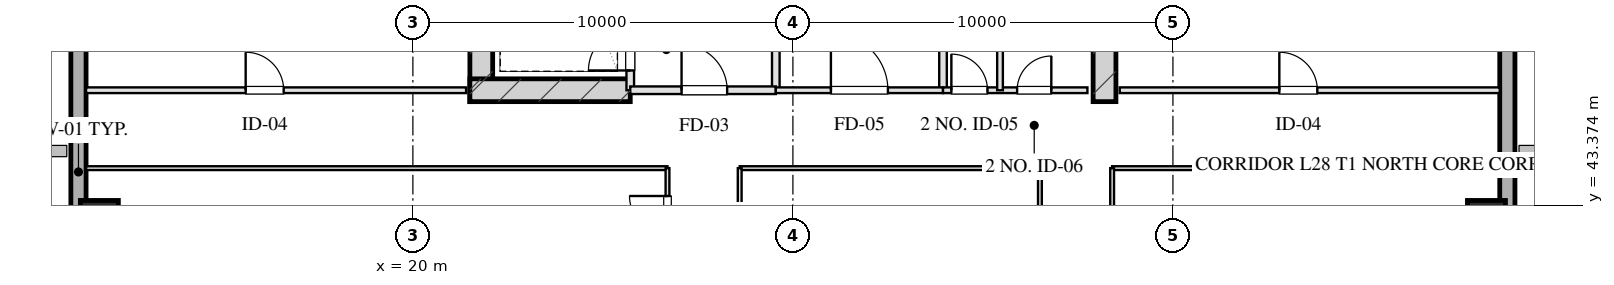
"""IFC4 building model, lengths in metres.
Left out: names, types, materials, properties, quantities, classifications, styles, units other than length and angle.
Written with IfcOpenShell. Run it as: python <this file> out.ifc"""

import sys

from ifc_helpers import new_model, si_unit, direction, frame, frame_2d, origin, origin_2d, place, context, subcontext, project, spatial, rectangle, hollow_rectangle, extrude, element, fill, save


model = new_model("IFC4")
c1 = context("Model", 3, precision=1e-05, world=origin(), true_north=direction((0.0, 1.0)))
c2 = subcontext(c1, "Body", "Model", "MODEL_VIEW")
j1 = project(units=[si_unit("LENGTHUNIT", "METRE"), si_unit("PLANEANGLEUNIT", "RADIAN")], contexts=[c1])
p1 = place(None, origin())
s1 = spatial("IfcSite", under=j1, at=p1, CompositionType="ELEMENT")
p2 = place(p1, origin())
s2 = spatial("IfcBuilding", under=s1, at=p2, CompositionType="ELEMENT")
p3 = place(p2, frame((0.0, 0.0, 110.4)))
s3 = spatial("IfcBuildingStorey", under=s2, at=p3, CompositionType="ELEMENT", Elevation=110.4)
for number, where, z_axis, x_axis in (
    (1, (21.8, 46.1, 0.0), (0.0, 0.0, 1.0), (0.0, 1.0, 0.0)),
    (2, (38.2, 46.1, 0.0), (0.0, 0.0, 1.0), (0.0, 1.0, 0.0)),
):
    element("IfcWall", number, at=place(p3, frame(where, z_axis=z_axis, x_axis=x_axis)), inside=s3, PredefinedType="SHEAR", context=c2, shape_type="SweptSolid", body=[
        extrude(rectangle(XDim=9.48, YDim=0.6, at=frame_2d((4.74, 0.0))), origin(), (0.0, 0.0, 1.0), 3.45),
    ])
p4 = place(p3, frame((21.5, 46.4, 0.0), z_axis=(0.0, 0.0, 1.0), x_axis=(1.0, 0.0, 0.0)))
e3 = element("IfcWall", 3, at=p4, inside=s3, PredefinedType="SHEAR", context=c2, shape_type="SweptSolid", body=[
    extrude(rectangle(XDim=4.22, YDim=0.6, at=frame_2d((2.11, 0.0))), origin(), (0.0, 0.0, 1.0), 3.45),
])
for number, where, z_axis, x_axis in (
    (4, (11.75, 43.0, 0.0), (0.0, 0.0, 1.0), (1.0, 0.0, 0.0)),
    (5, (48.25, 43.0, 0.0), (0.0, 0.0, 1.0), (1.0, 0.0, 0.0)),
):
    element("IfcColumn", number, at=place(p3, frame(where, z_axis=z_axis, x_axis=x_axis)), inside=s3, PredefinedType="COLUMN", context=c2, shape_type="SweptSolid", body=[
        extrude(hollow_rectangle(XDim=1.0, YDim=1.0, WallThickness=0.036, at=origin_2d()), origin(), (0.0, 0.0, 1.0), 3.451),
    ])
p5 = place(p3, frame((11.2, 9.0, 0.0), z_axis=(0.0, 0.0, 1.0), x_axis=(0.0, 1.0, 0.0)))
e6 = element("IfcWall", 6, at=p5, inside=s3, PredefinedType="SOLIDWALL", context=c2, shape_type="SweptSolid", body=[
    extrude(rectangle(XDim=50.0, YDim=0.4, at=frame_2d((25.0, 0.0))), origin(), (0.0, 0.0, 1.0), 2.61),
])
p6 = place(p5, frame((26.4, 0.0, 0.75)))
e7 = element("IfcOpeningElement", 7, at=p6, cuts=e6, PredefinedType="OPENING", context=c2, shape_type="SweptSolid", body=[
    extrude(rectangle(XDim=2.4, YDim=1.46, at=frame_2d((1.2, 0.73))), frame((0.0, 0.21, 0.0), z_axis=(0.0, -1.0, 0.0), x_axis=(1.0, 0.0, 0.0)), (0.0, 0.0, 1.0), 0.42),
])
p7 = place(p5, frame((18.65, 0.0, 0.0)))
e8 = element("IfcOpeningElement", 8, at=p7, cuts=e6, PredefinedType="OPENING", context=c2, shape_type="SweptSolid", body=[
    extrude(rectangle(XDim=1.1, YDim=2.15, at=frame_2d((0.55, 1.075))), frame((0.0, 0.21, 0.0), z_axis=(0.0, -1.0, 0.0), x_axis=(1.0, 0.0, 0.0)), (0.0, 0.0, 1.0), 0.42),
])
p8 = place(p3, frame((48.8, 59.0, 0.0), z_axis=(0.0, 0.0, 1.0), x_axis=(0.0, -1.0, 0.0)))
e9 = element("IfcWall", 9, at=p8, inside=s3, PredefinedType="SOLIDWALL", context=c2, shape_type="SweptSolid", body=[
    extrude(rectangle(XDim=50.0, YDim=0.4, at=frame_2d((25.0, 0.0))), origin(), (0.0, 0.0, 1.0), 2.61),
])
p9 = place(p8, frame((17.4, 0.0, 0.75)))
e10 = element("IfcOpeningElement", 10, at=p9, cuts=e9, PredefinedType="OPENING", context=c2, shape_type="SweptSolid", body=[
    extrude(rectangle(XDim=2.4, YDim=1.46, at=frame_2d((1.2, 0.73))), frame((0.0, 0.21, 0.0), z_axis=(0.0, -1.0, 0.0), x_axis=(1.0, 0.0, 0.0)), (0.0, 0.0, 1.0), 0.42),
])
p10 = place(p8, frame((30.226, 0.0, 0.0)))
e11 = element("IfcOpeningElement", 11, at=p10, cuts=e9, PredefinedType="OPENING", context=c2, shape_type="SweptSolid", body=[
    extrude(rectangle(XDim=1.1, YDim=2.15, at=frame_2d((0.55, 1.075))), frame((0.0, 0.21, 0.0), z_axis=(0.0, -1.0, 0.0), x_axis=(1.0, 0.0, 0.0)), (0.0, 0.0, 1.0), 0.42),
])
p11 = place(p3, frame((25.72, 46.4, 0.0), z_axis=(0.0, 0.0, 1.0), x_axis=(0.0, 1.0, 0.0)))
e12 = element("IfcWall", 12, at=p11, inside=s3, PredefinedType="PARTITIONING", context=c2, shape_type="SweptSolid", body=[
    extrude(rectangle(XDim=1.9, YDim=0.2, at=frame_2d((0.95, 0.0))), origin(), (0.0, 0.0, 1.0), 3.175),
])
p12 = place(p11, frame((0.52, 0.0, 0.0)))
e13 = element("IfcOpeningElement", 13, at=p12, cuts=e12, PredefinedType="OPENING", context=c2, shape_type="SweptSolid", body=[
    extrude(rectangle(XDim=1.1, YDim=2.05, at=frame_2d((0.55, 1.025))), frame((0.0, 0.11, 0.0), z_axis=(0.0, -1.0, 0.0), x_axis=(1.0, 0.0, 0.0)), (0.0, 0.0, 1.0), 0.22),
])
p13 = place(p3, frame((29.55, 46.4, 0.0), z_axis=(0.0, 0.0, 1.0), x_axis=(0.0, 1.0, 0.0)))
e14 = element("IfcWall", 14, at=p13, inside=s3, PredefinedType="PARTITIONING", context=c2, shape_type="SweptSolid", body=[
    extrude(rectangle(XDim=8.43, YDim=0.2, at=frame_2d((4.215, 0.0))), origin(), (0.0, 0.0, 1.0), 3.175),
])
p14 = place(p3, frame((25.72, 46.4, 0.0), z_axis=(0.0, 0.0, 1.0), x_axis=(1.0, 0.0, 0.0)))
e15 = element("IfcWall", 15, at=p14, inside=s3, PredefinedType="PARTITIONING", context=c2, shape_type="SweptSolid", body=[
    extrude(rectangle(XDim=3.83, YDim=0.2, at=frame_2d((1.915, 0.0))), origin(), (0.0, 0.0, 1.0), 3.175),
])
p15 = place(p14, frame((1.35, 0.0, 0.0)))
e16 = element("IfcOpeningElement", 16, at=p15, cuts=e15, PredefinedType="OPENING", context=c2, shape_type="SweptSolid", body=[
    extrude(rectangle(XDim=1.2, YDim=2.05, at=frame_2d((0.6, 1.025))), frame((0.0, 0.11, 0.0), z_axis=(0.0, -1.0, 0.0), x_axis=(1.0, 0.0, 0.0)), (0.0, 0.0, 1.0), 0.22),
])
p16 = place(p3, frame((33.95, 46.4, 0.0), z_axis=(0.0, 0.0, 1.0), x_axis=(0.0, 1.0, 0.0)))
e17 = element("IfcWall", 17, at=p16, inside=s3, PredefinedType="PARTITIONING", context=c2, shape_type="SweptSolid", body=[
    extrude(rectangle(XDim=8.43, YDim=0.2, at=frame_2d((4.215, 0.0))), origin(), (0.0, 0.0, 1.0), 3.175),
])
p17 = place(p3, frame((29.55, 46.4, 0.0), z_axis=(0.0, 0.0, 1.0), x_axis=(1.0, 0.0, 0.0)))
e18 = element("IfcWall", 18, at=p17, inside=s3, PredefinedType="PARTITIONING", context=c2, shape_type="SweptSolid", body=[
    extrude(rectangle(XDim=4.4, YDim=0.15, at=frame_2d((2.2, 0.0))), origin(), (0.0, 0.0, 1.0), 3.175),
])
p18 = place(p17, frame((1.45, 0.0, 0.0)))
e19 = element("IfcOpeningElement", 19, at=p18, cuts=e18, PredefinedType="OPENING", context=c2, shape_type="SweptSolid", body=[
    extrude(rectangle(XDim=1.5, YDim=2.05, at=frame_2d((0.75, 1.025))), frame((0.0, 0.085, 0.0), z_axis=(0.0, -1.0, 0.0), x_axis=(1.0, 0.0, 0.0)), (0.0, 0.0, 1.0), 0.17),
])
p19 = place(p3, frame((33.95, 46.4, 0.0), z_axis=(0.0, 0.0, 1.0), x_axis=(1.0, 0.0, 0.0)))
e20 = element("IfcWall", 20, at=p19, inside=s3, PredefinedType="PARTITIONING", context=c2, shape_type="SweptSolid", body=[
    extrude(rectangle(XDim=3.8, YDim=0.15, at=frame_2d((1.9, 0.0))), origin(), (0.0, 0.0, 1.0), 3.175),
])
p20 = place(p19, frame((0.22, 0.0, 0.0)))
e21 = element("IfcOpeningElement", 21, at=p20, cuts=e20, PredefinedType="OPENING", context=c2, shape_type="SweptSolid", body=[
    extrude(rectangle(XDim=0.95, YDim=2.05, at=frame_2d((0.475, 1.025))), frame((0.0, 0.085, 0.0), z_axis=(0.0, -1.0, 0.0), x_axis=(1.0, 0.0, 0.0)), (0.0, 0.0, 1.0), 0.17),
])
p21 = place(p19, frame((1.95, 0.0, 0.0)))
e22 = element("IfcOpeningElement", 22, at=p21, cuts=e20, PredefinedType="OPENING", context=c2, shape_type="SweptSolid", body=[
    extrude(rectangle(XDim=0.9, YDim=2.05, at=frame_2d((0.45, 1.025))), frame((0.0, 0.085, 0.0), z_axis=(0.0, -1.0, 0.0), x_axis=(1.0, 0.0, 0.0)), (0.0, 0.0, 1.0), 0.17),
])
p22 = place(p3, frame((35.45, 46.4, 0.0), z_axis=(0.0, 0.0, 1.0), x_axis=(0.0, 1.0, 0.0)))
e23 = element("IfcWall", 23, at=p22, inside=s3, PredefinedType="PARTITIONING", context=c2, shape_type="SweptSolid", body=[
    extrude(rectangle(XDim=8.43, YDim=0.15, at=frame_2d((4.215, 0.0))), origin(), (0.0, 0.0, 1.0), 2.765),
])
p23 = place(p22, frame((2.55, 0.0, 0.0)))
e24 = element("IfcOpeningElement", 24, at=p23, cuts=e23, PredefinedType="OPENING", context=c2, shape_type="SweptSolid", body=[
    extrude(rectangle(XDim=0.95, YDim=2.05, at=frame_2d((0.475, 1.025))), frame((0.0, 0.085, 0.0), z_axis=(0.0, -1.0, 0.0), x_axis=(1.0, 0.0, 0.0)), (0.0, 0.0, 1.0), 0.17),
])
p24 = place(p22, frame((5.6, 0.0, 0.0)))
e25 = element("IfcOpeningElement", 25, at=p24, cuts=e23, PredefinedType="OPENING", context=c2, shape_type="SweptSolid", body=[
    extrude(rectangle(XDim=0.9, YDim=2.05, at=frame_2d((0.45, 1.025))), frame((0.0, 0.085, 0.0), z_axis=(0.0, -1.0, 0.0), x_axis=(1.0, 0.0, 0.0)), (0.0, 0.0, 1.0), 0.17),
])
p25 = place(p3, frame((11.4, 46.4, 0.0), z_axis=(0.0, 0.0, 1.0), x_axis=(1.0, 0.0, 0.0)))
e26 = element("IfcWall", 26, at=p25, inside=s3, PredefinedType="PARTITIONING", context=c2, shape_type="SweptSolid", body=[
    extrude(rectangle(XDim=10.0, YDim=0.15, at=frame_2d((5.0, 0.0))), origin(), (0.0, 0.0, 1.0), 3.175),
])
p26 = place(p25, frame((4.2, 0.0, 0.0)))
e27 = element("IfcOpeningElement", 27, at=p26, cuts=e26, PredefinedType="OPENING", context=c2, shape_type="SweptSolid", body=[
    extrude(rectangle(XDim=1.0, YDim=2.05, at=frame_2d((0.5, 1.025))), frame((0.0, 0.085, 0.0), z_axis=(0.0, -1.0, 0.0), x_axis=(1.0, 0.0, 0.0)), (0.0, 0.0, 1.0), 0.17),
])
p27 = place(p3, frame((38.6, 46.4, 0.0), z_axis=(0.0, 0.0, 1.0), x_axis=(1.0, 0.0, 0.0)))
e28 = element("IfcWall", 28, at=p27, inside=s3, PredefinedType="PARTITIONING", context=c2, shape_type="SweptSolid", body=[
    extrude(rectangle(XDim=10.0, YDim=0.15, at=frame_2d((5.0, 0.0))), origin(), (0.0, 0.0, 1.0), 3.175),
])
p28 = place(p27, frame((4.2, 0.0, 0.0)))
e29 = element("IfcOpeningElement", 29, at=p28, cuts=e28, PredefinedType="OPENING", context=c2, shape_type="SweptSolid", body=[
    extrude(rectangle(XDim=1.0, YDim=2.05, at=frame_2d((0.5, 1.025))), frame((0.0, 0.085, 0.0), z_axis=(0.0, -1.0, 0.0), x_axis=(1.0, 0.0, 0.0)), (0.0, 0.0, 1.0), 0.17),
])
p29 = place(p3, frame((11.4, 44.35, 0.0), z_axis=(0.0, 0.0, 1.0), x_axis=(1.0, 0.0, 0.0)))
e30 = element("IfcWall", 30, at=p29, inside=s3, PredefinedType="MOVABLE", context=c2, shape_type="SweptSolid", body=[
    extrude(rectangle(XDim=15.3, YDim=0.1, at=frame_2d((7.65, 0.0))), origin(), (0.0, 0.0, 1.0), 3.175),
])
p30 = place(p3, frame((28.6, 44.35, 0.0), z_axis=(0.0, 0.0, 1.0), x_axis=(1.0, 0.0, 0.0)))
e31 = element("IfcWall", 31, at=p30, inside=s3, PredefinedType="MOVABLE", context=c2, shape_type="SweptSolid", body=[
    extrude(rectangle(XDim=7.9, YDim=0.1, at=frame_2d((3.95, 0.0))), origin(), (0.0, 0.0, 1.0), 3.175),
])
p31 = place(p3, frame((38.4, 44.35, 0.0), z_axis=(0.0, 0.0, 1.0), x_axis=(1.0, 0.0, 0.0)))
e32 = element("IfcWall", 32, at=p31, inside=s3, PredefinedType="MOVABLE", context=c2, shape_type="SweptSolid", body=[
    extrude(rectangle(XDim=10.2, YDim=0.1, at=frame_2d((5.1, 0.0))), origin(), (0.0, 0.0, 1.0), 3.175),
])
p32 = place(p3, frame((26.7, 23.65, 0.0), z_axis=(0.0, 0.0, 1.0), x_axis=(0.0, 1.0, 0.0)))
e33 = element("IfcWall", 33, at=p32, inside=s3, PredefinedType="MOVABLE", context=c2, shape_type="SweptSolid", body=[
    extrude(rectangle(XDim=20.7, YDim=0.1, at=frame_2d((10.35, 0.0))), origin(), (0.0, 0.0, 1.0), 3.175),
])
p33 = place(p32, frame((0.775, 0.0, 0.0)))
e34 = element("IfcOpeningElement", 34, at=p33, cuts=e33, PredefinedType="OPENING", context=c2, shape_type="SweptSolid", body=[
    extrude(rectangle(XDim=1.05, YDim=2.05, at=frame_2d((0.525, 1.025))), frame((0.0, 0.06, 0.0), z_axis=(0.0, -1.0, 0.0), x_axis=(1.0, 0.0, 0.0)), (0.0, 0.0, 1.0), 0.12),
])
p34 = place(p32, frame((3.95, 0.0, 0.0)))
e35 = element("IfcOpeningElement", 35, at=p34, cuts=e33, PredefinedType="OPENING", context=c2, shape_type="SweptSolid", body=[
    extrude(rectangle(XDim=0.85, YDim=2.05, at=frame_2d((0.425, 1.025))), frame((0.0, 0.06, 0.0), z_axis=(0.0, -1.0, 0.0), x_axis=(1.0, 0.0, 0.0)), (0.0, 0.0, 1.0), 0.12),
])
p35 = place(p32, frame((8.273, 0.0, 0.0)))
e36 = element("IfcOpeningElement", 36, at=p35, cuts=e33, PredefinedType="OPENING", context=c2, shape_type="SweptSolid", body=[
    extrude(rectangle(XDim=1.0, YDim=2.05, at=frame_2d((0.5, 1.025))), frame((0.0, 0.06, 0.0), z_axis=(0.0, -1.0, 0.0), x_axis=(1.0, 0.0, 0.0)), (0.0, 0.0, 1.0), 0.12),
])
p36 = place(p32, frame((12.559, 0.0, 0.0)))
e37 = element("IfcOpeningElement", 37, at=p36, cuts=e33, PredefinedType="OPENING", context=c2, shape_type="SweptSolid", body=[
    extrude(rectangle(XDim=1.0, YDim=2.05, at=frame_2d((0.5, 1.025))), frame((0.0, 0.06, 0.0), z_axis=(0.0, -1.0, 0.0), x_axis=(1.0, 0.0, 0.0)), (0.0, 0.0, 1.0), 0.12),
])
p37 = place(p32, frame((16.078, 0.0, 0.0)))
e38 = element("IfcOpeningElement", 38, at=p37, cuts=e33, PredefinedType="OPENING", context=c2, shape_type="SweptSolid", body=[
    extrude(rectangle(XDim=1.0, YDim=2.05, at=frame_2d((0.5, 1.025))), frame((0.0, 0.06, 0.0), z_axis=(0.0, -1.0, 0.0), x_axis=(1.0, 0.0, 0.0)), (0.0, 0.0, 1.0), 0.12),
])
p38 = place(p32, frame((18.967, 0.0, 0.0)))
e39 = element("IfcOpeningElement", 39, at=p38, cuts=e33, PredefinedType="OPENING", context=c2, shape_type="SweptSolid", body=[
    extrude(rectangle(XDim=1.0, YDim=2.05, at=frame_2d((0.5, 1.025))), frame((0.0, 0.06, 0.0), z_axis=(0.0, -1.0, 0.0), x_axis=(1.0, 0.0, 0.0)), (0.0, 0.0, 1.0), 0.12),
])
p39 = place(p3, frame((28.6, 23.65, 0.0), z_axis=(0.0, 0.0, 1.0), x_axis=(0.0, 1.0, 0.0)))
e40 = element("IfcWall", 40, at=p39, inside=s3, PredefinedType="MOVABLE", context=c2, shape_type="SweptSolid", body=[
    extrude(rectangle(XDim=20.7, YDim=0.1, at=frame_2d((10.35, 0.0))), origin(), (0.0, 0.0, 1.0), 3.175),
])
p40 = place(p39, frame((5.198, 0.0, 0.0)))
e41 = element("IfcOpeningElement", 41, at=p40, cuts=e40, PredefinedType="OPENING", context=c2, shape_type="SweptSolid", body=[
    extrude(rectangle(XDim=1.1, YDim=2.05, at=frame_2d((0.55, 1.025))), frame((0.0, 0.06, 0.0), z_axis=(0.0, -1.0, 0.0), x_axis=(1.0, 0.0, 0.0)), (0.0, 0.0, 1.0), 0.12),
])
p41 = place(p39, frame((15.667, 0.0, 0.0)))
e42 = element("IfcOpeningElement", 42, at=p41, cuts=e40, PredefinedType="OPENING", context=c2, shape_type="SweptSolid", body=[
    extrude(rectangle(XDim=1.1, YDim=2.05, at=frame_2d((0.55, 1.025))), frame((0.0, 0.06, 0.0), z_axis=(0.0, -1.0, 0.0), x_axis=(1.0, 0.0, 0.0)), (0.0, 0.0, 1.0), 0.12),
])
p42 = place(p3, frame((36.5, 23.65, 0.0), z_axis=(0.0, 0.0, 1.0), x_axis=(0.0, 1.0, 0.0)))
e43 = element("IfcWall", 43, at=p42, inside=s3, PredefinedType="MOVABLE", context=c2, shape_type="SweptSolid", body=[
    extrude(rectangle(XDim=20.7, YDim=0.1, at=frame_2d((10.35, 0.0))), origin(), (0.0, 0.0, 1.0), 3.175),
])
p43 = place(p3, frame((38.4, 23.65, 0.0), z_axis=(0.0, 0.0, 1.0), x_axis=(0.0, 1.0, 0.0)))
e44 = element("IfcWall", 44, at=p43, inside=s3, PredefinedType="MOVABLE", context=c2, shape_type="SweptSolid", body=[
    extrude(rectangle(XDim=20.7, YDim=0.1, at=frame_2d((10.35, 0.0))), origin(), (0.0, 0.0, 1.0), 3.175),
])
p44 = place(p43, frame((2.699, 0.0, 0.0)))
e45 = element("IfcOpeningElement", 45, at=p44, cuts=e44, PredefinedType="OPENING", context=c2, shape_type="SweptSolid", body=[
    extrude(rectangle(XDim=1.0, YDim=2.05, at=frame_2d((0.5, 1.025))), frame((0.0, 0.06, 0.0), z_axis=(0.0, -1.0, 0.0), x_axis=(1.0, 0.0, 0.0)), (0.0, 0.0, 1.0), 0.12),
])
p45 = place(p43, frame((9.875, 0.0, 0.0)))
e46 = element("IfcOpeningElement", 46, at=p45, cuts=e44, PredefinedType="OPENING", context=c2, shape_type="SweptSolid", body=[
    extrude(rectangle(XDim=1.0, YDim=2.05, at=frame_2d((0.5, 1.025))), frame((0.0, 0.06, 0.0), z_axis=(0.0, -1.0, 0.0), x_axis=(1.0, 0.0, 0.0)), (0.0, 0.0, 1.0), 0.12),
])
p46 = place(p43, frame((17.025, 0.0, 0.0)))
e47 = element("IfcOpeningElement", 47, at=p46, cuts=e44, PredefinedType="OPENING", context=c2, shape_type="SweptSolid", body=[
    extrude(rectangle(XDim=1.0, YDim=2.05, at=frame_2d((0.5, 1.025))), frame((0.0, 0.06, 0.0), z_axis=(0.0, -1.0, 0.0), x_axis=(1.0, 0.0, 0.0)), (0.0, 0.0, 1.0), 0.12),
])
p47 = place(p12, origin())
e48 = element("IfcDoor", 48, at=p47, inside=s3, OperationType="SINGLE_SWING_LEFT", PredefinedType="DOOR", context=c2, shape_type="SweptSolid", body=[
    extrude(rectangle(XDim=1.1, YDim=2.05, at=frame_2d((0.55, 1.025))), frame((0.0, 0.025, 0.0), z_axis=(0.0, -1.0, 0.0), x_axis=(1.0, 0.0, 0.0)), (0.0, 0.0, 1.0), 0.05),
])
fill(e13, e48)
p48 = place(p15, origin())
e49 = element("IfcDoor", 49, at=p48, inside=s3, OperationType="SINGLE_SWING_LEFT", PredefinedType="DOOR", context=c2, shape_type="SweptSolid", body=[
    extrude(rectangle(XDim=1.2, YDim=2.05, at=frame_2d((0.6, 1.025))), frame((0.0, 0.025, 0.0), z_axis=(0.0, -1.0, 0.0), x_axis=(1.0, 0.0, 0.0)), (0.0, 0.0, 1.0), 0.05),
])
fill(e16, e49)
p49 = place(p18, origin())
e50 = element("IfcDoor", 50, at=p49, inside=s3, OperationType="SINGLE_SWING_LEFT", PredefinedType="DOOR", context=c2, shape_type="SweptSolid", body=[
    extrude(rectangle(XDim=1.5, YDim=2.05, at=frame_2d((0.75, 1.025))), frame((0.0, 0.025, 0.0), z_axis=(0.0, -1.0, 0.0), x_axis=(1.0, 0.0, 0.0)), (0.0, 0.0, 1.0), 0.05),
])
fill(e19, e50)
p50 = place(p20, origin())
e51 = element("IfcDoor", 51, at=p50, inside=s3, OperationType="SINGLE_SWING_LEFT", PredefinedType="DOOR", context=c2, shape_type="SweptSolid", body=[
    extrude(rectangle(XDim=0.95, YDim=2.05, at=frame_2d((0.475, 1.025))), frame((0.0, 0.025, 0.0), z_axis=(0.0, -1.0, 0.0), x_axis=(1.0, 0.0, 0.0)), (0.0, 0.0, 1.0), 0.05),
])
fill(e21, e51)
p51 = place(p21, origin())
e52 = element("IfcDoor", 52, at=p51, inside=s3, OperationType="SINGLE_SWING_RIGHT", PredefinedType="DOOR", context=c2, shape_type="SweptSolid", body=[
    extrude(rectangle(XDim=0.9, YDim=2.05, at=frame_2d((0.45, 1.025))), frame((0.0, 0.025, 0.0), z_axis=(0.0, -1.0, 0.0), x_axis=(1.0, 0.0, 0.0)), (0.0, 0.0, 1.0), 0.05),
])
fill(e22, e52)
p52 = place(p26, origin())
e53 = element("IfcDoor", 53, at=p52, inside=s3, OperationType="SINGLE_SWING_LEFT", PredefinedType="DOOR", context=c2, shape_type="SweptSolid", body=[
    extrude(rectangle(XDim=1.0, YDim=2.05, at=frame_2d((0.5, 1.025))), frame((0.0, 0.025, 0.0), z_axis=(0.0, -1.0, 0.0), x_axis=(1.0, 0.0, 0.0)), (0.0, 0.0, 1.0), 0.05),
])
fill(e27, e53)
p53 = place(p28, origin())
e54 = element("IfcDoor", 54, at=p53, inside=s3, OperationType="SINGLE_SWING_LEFT", PredefinedType="DOOR", context=c2, shape_type="SweptSolid", body=[
    extrude(rectangle(XDim=1.0, YDim=2.05, at=frame_2d((0.5, 1.025))), frame((0.0, 0.025, 0.0), z_axis=(0.0, -1.0, 0.0), x_axis=(1.0, 0.0, 0.0)), (0.0, 0.0, 1.0), 0.05),
])
fill(e29, e54)
p54 = place(p38, origin())
e55 = element("IfcDoor", 55, at=p54, inside=s3, OperationType="SINGLE_SWING_RIGHT", PredefinedType="DOOR", context=c2, shape_type="SweptSolid", body=[
    extrude(rectangle(XDim=1.0, YDim=2.05, at=frame_2d((0.5, 1.025))), frame((0.0, 0.025, 0.0), z_axis=(0.0, -1.0, 0.0), x_axis=(1.0, 0.0, 0.0)), (0.0, 0.0, 1.0), 0.05),
])
fill(e39, e55)
save(model, sys.argv[1])
